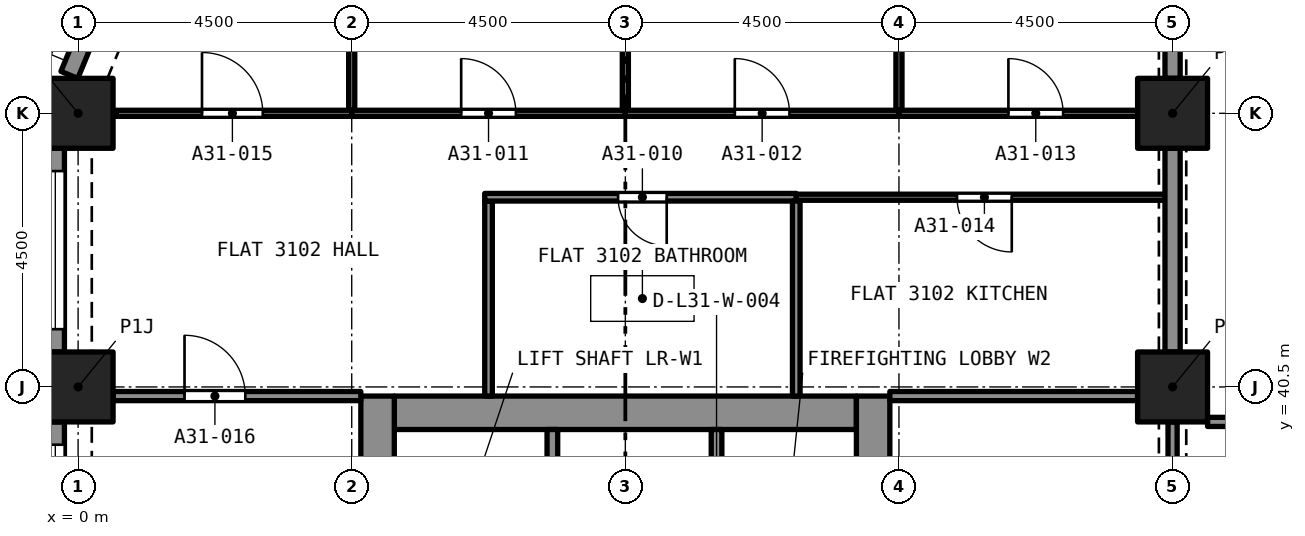
"""IFC4 building model, lengths in metres.
Left out: names, types, materials, properties, quantities, classifications, styles, units other than length and angle.
Written with IfcOpenShell. Run it as: python <this file> out.ifc"""

import sys

from ifc_helpers import new_model, si_unit, direction, frame, frame_2d, origin, origin_2d, place, context, subcontext, project, spatial, rectangle, extrude, element, fill, save


model = new_model("IFC4")
c1 = context("Model", 3, precision=1e-05, world=origin(), true_north=direction((0.0, 1.0)))
c2 = subcontext(c1, "Body", "Model", "MODEL_VIEW")
j1 = project(units=[si_unit("LENGTHUNIT", "METRE"), si_unit("PLANEANGLEUNIT", "RADIAN")], contexts=[c1])
p1 = place(None, origin())
s1 = spatial("IfcSite", under=j1, at=p1, CompositionType="ELEMENT")
p2 = place(p1, origin())
s2 = spatial("IfcBuilding", under=s1, at=p2, CompositionType="ELEMENT")
p3 = place(p2, frame((0.0, 0.0, 112.0)))
s3 = spatial("IfcBuildingStorey", under=s2, at=p3, CompositionType="ELEMENT", Elevation=112.0)
for number, where, z_axis, x_axis in (
    (1, (0.0, 40.5, 0.0), (0.0, 0.0, 1.0), (1.0, 0.0, 0.0)),
    (2, (18.0, 40.5, 0.0), (0.0, 0.0, 1.0), (1.0, 0.0, 0.0)),
    (3, (0.0, 45.0, 0.0), (0.0, 0.0, 1.0), (1.0, 0.0, 0.0)),
    (4, (18.0, 45.0, 0.0), (0.0, 0.0, 1.0), (1.0, 0.0, 0.0)),
):
    element("IfcColumn", number, at=place(p3, frame(where, z_axis=z_axis, x_axis=x_axis)), inside=s3, PredefinedType="COLUMN", context=c2, shape_type="SweptSolid", body=[
        extrude(rectangle(XDim=1.15, YDim=1.15, at=origin_2d()), origin(), (0.0, 0.0, 1.0), 3.2),
    ])
p4 = place(p3, frame((5.2, 40.075, 0.0), z_axis=(0.0, 0.0, 1.0), x_axis=(1.0, 0.0, 0.0)))
e5 = element("IfcWall", 5, at=p4, inside=s3, PredefinedType="SOLIDWALL", context=c2, shape_type="SweptSolid", body=[
    extrude(rectangle(XDim=7.6, YDim=0.55, at=frame_2d((3.8, 0.0))), origin(), (0.0, 0.0, 1.0), 3.2),
])
p5 = place(p3, frame((4.925, 27.15, 0.0), z_axis=(0.0, 0.0, 1.0), x_axis=(0.0, 1.0, 0.0)))
e6 = element("IfcWall", 6, at=p5, inside=s3, PredefinedType="SOLIDWALL", context=c2, shape_type="SweptSolid", body=[
    extrude(rectangle(XDim=13.2, YDim=0.55, at=frame_2d((6.6, 0.0))), origin(), (0.0, 0.0, 1.0), 3.2),
])
p6 = place(p5, frame((8.8, 0.0, 0.0)))
e7 = element("IfcOpeningElement", 7, at=p6, cuts=e6, PredefinedType="OPENING", context=c2, shape_type="SweptSolid", body=[
    extrude(rectangle(XDim=1.2, YDim=2.1, at=frame_2d((0.6, 1.05))), frame((0.0, 0.285, 0.0), z_axis=(0.0, -1.0, 0.0), x_axis=(1.0, 0.0, 0.0)), (0.0, 0.0, 1.0), 0.57),
])
p7 = place(p3, frame((13.075, 27.15, 0.0), z_axis=(0.0, 0.0, 1.0), x_axis=(0.0, 1.0, 0.0)))
e8 = element("IfcWall", 8, at=p7, inside=s3, PredefinedType="SOLIDWALL", context=c2, shape_type="SweptSolid", body=[
    extrude(rectangle(XDim=13.2, YDim=0.55, at=frame_2d((6.6, 0.0))), origin(), (0.0, 0.0, 1.0), 3.2),
])
p8 = place(p7, frame((10.95, 0.0, 0.0)))
e9 = element("IfcOpeningElement", 9, at=p8, cuts=e8, PredefinedType="OPENING", context=c2, shape_type="SweptSolid", body=[
    extrude(rectangle(XDim=1.1, YDim=2.1, at=frame_2d((0.55, 1.05))), frame((0.0, 0.285, 0.0), z_axis=(0.0, -1.0, 0.0), x_axis=(1.0, 0.0, 0.0)), (0.0, 0.0, 1.0), 0.57),
])
p9 = place(p7, frame((8.8, 0.0, 0.0)))
e10 = element("IfcOpeningElement", 10, at=p9, cuts=e8, PredefinedType="OPENING", context=c2, shape_type="SweptSolid", body=[
    extrude(rectangle(XDim=1.2, YDim=2.1, at=frame_2d((0.6, 1.05))), frame((0.0, 0.285, 0.0), z_axis=(0.0, -1.0, 0.0), x_axis=(1.0, 0.0, 0.0)), (0.0, 0.0, 1.0), 0.57),
])
p10 = place(p3, frame((-0.144, 45.632, 0.0), z_axis=(0.0, 0.0, 1.0), x_axis=(0.382723818695, 0.923862802911, 0.0)))
e11 = element("IfcWall", 11, at=p10, inside=s3, PredefinedType="SOLIDWALL", context=c2, shape_type="SweptSolid", body=[
    extrude(rectangle(XDim=2.164, YDim=0.3, at=frame_2d((1.082, 0.0))), origin(), (0.0, 0.0, 1.0), 3.2),
])
p11 = place(p10, frame((0.493, 0.0, 0.45)))
e12 = element("IfcOpeningElement", 12, at=p11, cuts=e11, PredefinedType="OPENING", context=c2, shape_type="SweptSolid", body=[
    extrude(rectangle(XDim=1.4, YDim=1.95, at=frame_2d((0.7, 0.975))), frame((0.0, 0.16, 0.0), z_axis=(0.0, -1.0, 0.0), x_axis=(1.0, 0.0, 0.0)), (0.0, 0.0, 1.0), 0.32),
])
p12 = place(p3, frame((-0.375, 41.075, 0.0), z_axis=(0.0, 0.0, 1.0), x_axis=(0.0, 1.0, 0.0)))
e13 = element("IfcWall", 13, at=p12, inside=s3, PredefinedType="SOLIDWALL", context=c2, shape_type="SweptSolid", body=[
    extrude(rectangle(XDim=3.35, YDim=0.3, at=frame_2d((1.675, 0.0))), origin(), (0.0, 0.0, 1.0), 3.2),
])
p13 = place(p12, frame((0.375, 0.0, 0.45)))
e14 = element("IfcOpeningElement", 14, at=p13, cuts=e13, PredefinedType="OPENING", context=c2, shape_type="SweptSolid", body=[
    extrude(rectangle(XDim=2.6, YDim=1.95, at=frame_2d((1.3, 0.975))), frame((0.0, 0.16, 0.0), z_axis=(0.0, -1.0, 0.0), x_axis=(1.0, 0.0, 0.0)), (0.0, 0.0, 1.0), 0.32),
])
p14 = place(p3, frame((-0.375, 36.575, 0.0), z_axis=(0.0, 0.0, 1.0), x_axis=(0.0, 1.0, 0.0)))
e15 = element("IfcWall", 15, at=p14, inside=s3, PredefinedType="SOLIDWALL", context=c2, shape_type="SweptSolid", body=[
    extrude(rectangle(XDim=3.35, YDim=0.3, at=frame_2d((1.675, 0.0))), origin(), (0.0, 0.0, 1.0), 3.2),
])
p15 = place(p14, frame((0.375, 0.0, 0.45)))
e16 = element("IfcOpeningElement", 16, at=p15, cuts=e15, PredefinedType="OPENING", context=c2, shape_type="SweptSolid", body=[
    extrude(rectangle(XDim=2.6, YDim=1.95, at=frame_2d((1.3, 0.975))), frame((0.0, 0.16, 0.0), z_axis=(0.0, -1.0, 0.0), x_axis=(1.0, 0.0, 0.0)), (0.0, 0.0, 1.0), 0.32),
])
p16 = place(p3, frame((6.75, 40.35, 0.0), z_axis=(0.0, 0.0, 1.0), x_axis=(0.0, 1.0, 0.0)))
e17 = element("IfcWall", 17, at=p16, inside=s3, PredefinedType="PARTITIONING", context=c2, shape_type="SweptSolid", body=[
    extrude(rectangle(XDim=3.208, YDim=0.125, at=frame_2d((1.604, 0.0))), origin(), (0.0, 0.0, 1.0), 2.9),
])
p17 = place(p3, frame((11.811, 43.62, 0.0), z_axis=(0.0, 0.0, 1.0), x_axis=(-1.0, 0.0, 0.0)))
e18 = element("IfcWall", 18, at=p17, inside=s3, PredefinedType="PARTITIONING", context=c2, shape_type="SweptSolid", body=[
    extrude(rectangle(XDim=5.123, YDim=0.125, at=frame_2d((2.562, 0.0))), origin(), (0.0, 0.0, 1.0), 2.9),
])
p18 = place(p17, frame((2.13, 0.0, 0.0)))
e19 = element("IfcOpeningElement", 19, at=p18, cuts=e18, PredefinedType="OPENING", context=c2, shape_type="SweptSolid", body=[
    extrude(rectangle(XDim=0.8, YDim=2.1, at=frame_2d((0.4, 1.05))), frame((0.0, 0.073, 0.0), z_axis=(0.0, -1.0, 0.0), x_axis=(1.0, 0.0, 0.0)), (0.0, 0.0, 1.0), 0.145),
])
p19 = place(p3, frame((11.811, 40.35, 0.0), z_axis=(0.0, 0.0, 1.0), x_axis=(0.0, 1.0, 0.0)))
e20 = element("IfcWall", 20, at=p19, inside=s3, PredefinedType="PARTITIONING", context=c2, shape_type="SweptSolid", body=[
    extrude(rectangle(XDim=3.208, YDim=0.125, at=frame_2d((1.604, 0.0))), origin(), (0.0, 0.0, 1.0), 2.9),
])
p20 = place(p3, frame((9.0, 45.05, 0.0), z_axis=(0.0, 0.0, 1.0), x_axis=(0.0, 1.0, 0.0)))
e21 = element("IfcWall", 21, at=p20, inside=s3, PredefinedType="PARTITIONING", context=c2, shape_type="SweptSolid", body=[
    extrude(rectangle(XDim=3.875, YDim=0.1, at=frame_2d((1.938, 0.0))), origin(), (0.0, 0.0, 1.0), 2.9),
])
p21 = place(p3, frame((4.5, 45.0, 0.0), z_axis=(0.0, 0.0, 1.0), x_axis=(1.0, 0.0, 0.0)))
e22 = element("IfcWall", 22, at=p21, inside=s3, PredefinedType="PARTITIONING", context=c2, shape_type="SweptSolid", body=[
    extrude(rectangle(XDim=4.5, YDim=0.1, at=frame_2d((2.25, 0.0))), origin(), (0.0, 0.0, 1.0), 2.9),
])
p22 = place(p21, frame((1.8, 0.0, 0.0)))
e23 = element("IfcOpeningElement", 23, at=p22, cuts=e22, PredefinedType="OPENING", context=c2, shape_type="SweptSolid", body=[
    extrude(rectangle(XDim=0.9, YDim=2.1, at=frame_2d((0.45, 1.05))), frame((0.0, 0.06, 0.0), z_axis=(0.0, -1.0, 0.0), x_axis=(1.0, 0.0, 0.0)), (0.0, 0.0, 1.0), 0.12),
])
p23 = place(p3, frame((4.5, 45.05, 0.0), z_axis=(0.0, 0.0, 1.0), x_axis=(0.0, 1.0, 0.0)))
e24 = element("IfcWall", 24, at=p23, inside=s3, PredefinedType="PARTITIONING", context=c2, shape_type="SweptSolid", body=[
    extrude(rectangle(XDim=3.828, YDim=0.1, at=frame_2d((1.914, 0.0))), origin(), (0.0, 0.0, 1.0), 2.9),
])
p24 = place(p3, frame((13.5, 45.05, 0.0), z_axis=(0.0, 0.0, 1.0), x_axis=(0.0, 1.0, 0.0)))
e25 = element("IfcWall", 25, at=p24, inside=s3, PredefinedType="PARTITIONING", context=c2, shape_type="SweptSolid", body=[
    extrude(rectangle(XDim=3.875, YDim=0.1, at=frame_2d((1.938, 0.0))), origin(), (0.0, 0.0, 1.0), 2.9),
])
p25 = place(p3, frame((9.0, 45.0, 0.0), z_axis=(0.0, 0.0, 1.0), x_axis=(1.0, 0.0, 0.0)))
e26 = element("IfcWall", 26, at=p25, inside=s3, PredefinedType="PARTITIONING", context=c2, shape_type="SweptSolid", body=[
    extrude(rectangle(XDim=4.5, YDim=0.1, at=frame_2d((2.25, 0.0))), origin(), (0.0, 0.0, 1.0), 2.9),
])
p26 = place(p25, frame((1.8, 0.0, 0.0)))
e27 = element("IfcOpeningElement", 27, at=p26, cuts=e26, PredefinedType="OPENING", context=c2, shape_type="SweptSolid", body=[
    extrude(rectangle(XDim=0.9, YDim=2.1, at=frame_2d((0.45, 1.05))), frame((0.0, 0.06, 0.0), z_axis=(0.0, -1.0, 0.0), x_axis=(1.0, 0.0, 0.0)), (0.0, 0.0, 1.0), 0.12),
])
p27 = place(p3, frame((13.5, 45.0, 0.0), z_axis=(0.0, 0.0, 1.0), x_axis=(1.0, 0.0, 0.0)))
e28 = element("IfcWall", 28, at=p27, inside=s3, PredefinedType="PARTITIONING", context=c2, shape_type="SweptSolid", body=[
    extrude(rectangle(XDim=3.925, YDim=0.1, at=frame_2d((1.962, 0.0))), origin(), (0.0, 0.0, 1.0), 2.9),
])
p28 = place(p27, frame((1.8, 0.0, 0.0)))
e29 = element("IfcOpeningElement", 29, at=p28, cuts=e28, PredefinedType="OPENING", context=c2, shape_type="SweptSolid", body=[
    extrude(rectangle(XDim=0.9, YDim=2.1, at=frame_2d((0.45, 1.05))), frame((0.0, 0.06, 0.0), z_axis=(0.0, -1.0, 0.0), x_axis=(1.0, 0.0, 0.0)), (0.0, 0.0, 1.0), 0.12),
])
p29 = place(p3, frame((18.0, 45.575, 0.0), z_axis=(0.0, 0.0, 1.0), x_axis=(0.0, 1.0, 0.0)))
e30 = element("IfcWall", 30, at=p29, inside=s3, PredefinedType="PARTITIONING", context=c2, shape_type="SweptSolid", body=[
    extrude(rectangle(XDim=3.35, YDim=0.25, at=frame_2d((1.675, 0.0))), origin(), (0.0, 0.0, 1.0), 2.38),
])
p30 = place(p3, frame((17.875, 43.62, 0.0), z_axis=(0.0, 0.0, 1.0), x_axis=(-1.0, 0.0, 0.0)))
e31 = element("IfcWall", 31, at=p30, inside=s3, PredefinedType="PARTITIONING", context=c2, shape_type="SweptSolid", body=[
    extrude(rectangle(XDim=6.064, YDim=0.1, at=frame_2d((3.032, 0.0))), origin(), (0.0, 0.0, 1.0), 2.9),
])
p31 = place(p30, frame((2.52, 0.0, 0.0)))
e32 = element("IfcOpeningElement", 32, at=p31, cuts=e31, PredefinedType="OPENING", context=c2, shape_type="SweptSolid", body=[
    extrude(rectangle(XDim=0.9, YDim=2.1, at=frame_2d((0.45, 1.05))), frame((0.0, 0.06, 0.0), z_axis=(0.0, -1.0, 0.0), x_axis=(1.0, 0.0, 0.0)), (0.0, 0.0, 1.0), 0.12),
])
p32 = place(p3, frame((0.622, 45.0, 0.0), z_axis=(0.0, 0.0, 1.0), x_axis=(1.0, 0.0, 0.0)))
e33 = element("IfcWall", 33, at=p32, inside=s3, PredefinedType="PARTITIONING", context=c2, shape_type="SweptSolid", body=[
    extrude(rectangle(XDim=3.878, YDim=0.1, at=frame_2d((1.939, 0.0))), origin(), (0.0, 0.0, 1.0), 2.9),
])
p33 = place(p32, frame((1.415, 0.0, 0.0)))
e34 = element("IfcOpeningElement", 34, at=p33, cuts=e33, PredefinedType="OPENING", context=c2, shape_type="SweptSolid", body=[
    extrude(rectangle(XDim=1.0, YDim=2.1, at=frame_2d((0.5, 1.05))), frame((0.0, 0.06, 0.0), z_axis=(0.0, -1.0, 0.0), x_axis=(1.0, 0.0, 0.0)), (0.0, 0.0, 1.0), 0.12),
])
p34 = place(p3, frame((0.575, 40.35, 0.0), z_axis=(0.0, 0.0, 1.0), x_axis=(1.0, 0.0, 0.0)))
e35 = element("IfcWall", 35, at=p34, inside=s3, PredefinedType="PARTITIONING", context=c2, shape_type="SweptSolid", body=[
    extrude(rectangle(XDim=4.075, YDim=0.15, at=frame_2d((2.038, 0.0))), origin(), (0.0, 0.0, 1.0), 2.9),
])
p35 = place(p34, frame((1.175, 0.0, 0.0)))
e36 = element("IfcOpeningElement", 36, at=p35, cuts=e35, PredefinedType="OPENING", context=c2, shape_type="SweptSolid", body=[
    extrude(rectangle(XDim=1.0, YDim=2.1, at=frame_2d((0.5, 1.05))), frame((0.0, 0.085, 0.0), z_axis=(0.0, -1.0, 0.0), x_axis=(1.0, 0.0, 0.0)), (0.0, 0.0, 1.0), 0.17),
])
p36 = place(p3, frame((18.0, 41.075, 0.0), z_axis=(0.0, 0.0, 1.0), x_axis=(0.0, 1.0, 0.0)))
e37 = element("IfcWall", 37, at=p36, inside=s3, PredefinedType="PARTITIONING", context=c2, shape_type="SweptSolid", body=[
    extrude(rectangle(XDim=3.35, YDim=0.25, at=frame_2d((1.675, 0.0))), origin(), (0.0, 0.0, 1.0), 2.38),
])
p37 = place(p3, frame((13.35, 40.35, 0.0), z_axis=(0.0, 0.0, 1.0), x_axis=(1.0, 0.0, 0.0)))
e38 = element("IfcWall", 38, at=p37, inside=s3, PredefinedType="PARTITIONING", context=c2, shape_type="SweptSolid", body=[
    extrude(rectangle(XDim=4.075, YDim=0.15, at=frame_2d((2.038, 0.0))), origin(), (0.0, 0.0, 1.0), 2.9),
])
p38 = place(p3, frame((18.575, 39.925, 0.0), z_axis=(0.0, 0.0, 1.0), x_axis=(1.0, 0.0, 0.0)))
e39 = element("IfcWall", 39, at=p38, inside=s3, PredefinedType="PARTITIONING", context=c2, shape_type="SweptSolid", body=[
    extrude(rectangle(XDim=8.425, YDim=0.15, at=frame_2d((4.212, 0.0))), origin(), (0.0, 0.0, 1.0), 2.75),
])
p39 = place(p38, frame((3.425, 0.0, 0.0)))
e40 = element("IfcOpeningElement", 40, at=p39, cuts=e39, PredefinedType="OPENING", context=c2, shape_type="SweptSolid", body=[
    extrude(rectangle(XDim=1.0, YDim=2.1, at=frame_2d((0.5, 1.05))), frame((0.0, 0.085, 0.0), z_axis=(0.0, -1.0, 0.0), x_axis=(1.0, 0.0, 0.0)), (0.0, 0.0, 1.0), 0.17),
])
p40 = place(p3, frame((18.0, 39.925, 0.0), z_axis=(0.0, 0.0, 1.0), x_axis=(0.0, -1.0, 0.0)))
e41 = element("IfcWall", 41, at=p40, inside=s3, PredefinedType="PARTITIONING", context=c2, shape_type="SweptSolid", body=[
    extrude(rectangle(XDim=3.35, YDim=0.15, at=frame_2d((1.675, 0.0))), origin(), (0.0, 0.0, 1.0), 2.38),
])
p41 = place(p40, frame((1.075, 0.0, 0.0)))
e42 = element("IfcOpeningElement", 42, at=p41, cuts=e41, PredefinedType="OPENING", context=c2, shape_type="SweptSolid", body=[
    extrude(rectangle(XDim=1.2, YDim=2.1, at=frame_2d((0.6, 1.05))), frame((0.0, 0.085, 0.0), z_axis=(0.0, -1.0, 0.0), x_axis=(1.0, 0.0, 0.0)), (0.0, 0.0, 1.0), 0.17),
])
p42 = place(p3, frame((7.8, 37.5, 0.0), z_axis=(0.0, 0.0, 1.0), x_axis=(0.0, 1.0, 0.0)))
e43 = element("IfcWall", 43, at=p42, inside=s3, PredefinedType="SOLIDWALL", context=c2, shape_type="SweptSolid", body=[
    extrude(rectangle(XDim=2.3, YDim=0.175, at=frame_2d((1.15, 0.0))), origin(), (0.0, 0.0, 1.0), 2.9),
])
p43 = place(p3, frame((10.5, 37.5, 0.0), z_axis=(0.0, 0.0, 1.0), x_axis=(0.0, 1.0, 0.0)))
e44 = element("IfcWall", 44, at=p43, inside=s3, PredefinedType="SOLIDWALL", context=c2, shape_type="SweptSolid", body=[
    extrude(rectangle(XDim=2.3, YDim=0.175, at=frame_2d((1.15, 0.0))), origin(), (0.0, 0.0, 1.0), 2.9),
])
p44 = place(p43, frame((0.65, 0.0, 0.0)))
e45 = element("IfcOpeningElement", 45, at=p44, cuts=e44, PredefinedType="OPENING", context=c2, shape_type="SweptSolid", body=[
    extrude(rectangle(XDim=1.0, YDim=2.1, at=frame_2d((0.5, 1.05))), frame((0.0, 0.097, 0.0), z_axis=(0.0, -1.0, 0.0), x_axis=(1.0, 0.0, 0.0)), (0.0, 0.0, 1.0), 0.195),
])
p45 = place(p13, origin())
e46 = element("IfcWindow", 46, at=p45, inside=s3, PartitioningType="SINGLE_PANEL", PredefinedType="WINDOW", context=c2, shape_type="SweptSolid", body=[
    extrude(rectangle(XDim=2.6, YDim=1.95, at=frame_2d((1.3, 0.975))), frame((0.0, 0.03, 0.0), z_axis=(0.0, -1.0, 0.0), x_axis=(1.0, 0.0, 0.0)), (0.0, 0.0, 1.0), 0.06),
])
fill(e14, e46)
p46 = place(p15, origin())
e47 = element("IfcWindow", 47, at=p46, inside=s3, PartitioningType="SINGLE_PANEL", PredefinedType="WINDOW", context=c2, shape_type="SweptSolid", body=[
    extrude(rectangle(XDim=2.6, YDim=1.95, at=frame_2d((1.3, 0.975))), frame((0.0, 0.03, 0.0), z_axis=(0.0, -1.0, 0.0), x_axis=(1.0, 0.0, 0.0)), (0.0, 0.0, 1.0), 0.06),
])
fill(e16, e47)
p47 = place(p18, origin())
e48 = element("IfcDoor", 48, at=p47, inside=s3, OperationType="SINGLE_SWING_LEFT", PredefinedType="DOOR", context=c2, shape_type="SweptSolid", body=[
    extrude(rectangle(XDim=0.8, YDim=2.1, at=frame_2d((0.4, 1.05))), frame((0.0, 0.025, 0.0), z_axis=(0.0, -1.0, 0.0), x_axis=(1.0, 0.0, 0.0)), (0.0, 0.0, 1.0), 0.05),
])
fill(e19, e48)
p48 = place(p22, origin())
e49 = element("IfcDoor", 49, at=p48, inside=s3, OperationType="SINGLE_SWING_RIGHT", PredefinedType="DOOR", context=c2, shape_type="SweptSolid", body=[
    extrude(rectangle(XDim=0.9, YDim=2.1, at=frame_2d((0.45, 1.05))), frame((0.0, 0.025, 0.0), z_axis=(0.0, -1.0, 0.0), x_axis=(1.0, 0.0, 0.0)), (0.0, 0.0, 1.0), 0.05),
])
fill(e23, e49)
p49 = place(p26, origin())
e50 = element("IfcDoor", 50, at=p49, inside=s3, OperationType="SINGLE_SWING_LEFT", PredefinedType="DOOR", context=c2, shape_type="SweptSolid", body=[
    extrude(rectangle(XDim=0.9, YDim=2.1, at=frame_2d((0.45, 1.05))), frame((0.0, 0.025, 0.0), z_axis=(0.0, -1.0, 0.0), x_axis=(1.0, 0.0, 0.0)), (0.0, 0.0, 1.0), 0.05),
])
fill(e27, e50)
p50 = place(p28, origin())
e51 = element("IfcDoor", 51, at=p50, inside=s3, OperationType="SINGLE_SWING_RIGHT", PredefinedType="DOOR", context=c2, shape_type="SweptSolid", body=[
    extrude(rectangle(XDim=0.9, YDim=2.1, at=frame_2d((0.45, 1.05))), frame((0.0, 0.025, 0.0), z_axis=(0.0, -1.0, 0.0), x_axis=(1.0, 0.0, 0.0)), (0.0, 0.0, 1.0), 0.05),
])
fill(e29, e51)
p51 = place(p31, origin())
e52 = element("IfcDoor", 52, at=p51, inside=s3, OperationType="SINGLE_SWING_LEFT", PredefinedType="DOOR", context=c2, shape_type="SweptSolid", body=[
    extrude(rectangle(XDim=0.9, YDim=2.1, at=frame_2d((0.45, 1.05))), frame((0.0, 0.025, 0.0), z_axis=(0.0, -1.0, 0.0), x_axis=(1.0, 0.0, 0.0)), (0.0, 0.0, 1.0), 0.05),
])
fill(e32, e52)
p52 = place(p33, origin())
e53 = element("IfcDoor", 53, at=p52, inside=s3, OperationType="SINGLE_SWING_LEFT", PredefinedType="DOOR", context=c2, shape_type="SweptSolid", body=[
    extrude(rectangle(XDim=1.0, YDim=2.1, at=frame_2d((0.5, 1.05))), frame((0.0, 0.025, 0.0), z_axis=(0.0, -1.0, 0.0), x_axis=(1.0, 0.0, 0.0)), (0.0, 0.0, 1.0), 0.05),
])
fill(e34, e53)
p53 = place(p35, origin())
e54 = element("IfcDoor", 54, at=p53, inside=s3, OperationType="SINGLE_SWING_LEFT", PredefinedType="DOOR", context=c2, shape_type="SweptSolid", body=[
    extrude(rectangle(XDim=1.0, YDim=2.1, at=frame_2d((0.5, 1.05))), frame((0.0, 0.025, 0.0), z_axis=(0.0, -1.0, 0.0), x_axis=(1.0, 0.0, 0.0)), (0.0, 0.0, 1.0), 0.05),
])
fill(e36, e54)
save(model, sys.argv[1])
